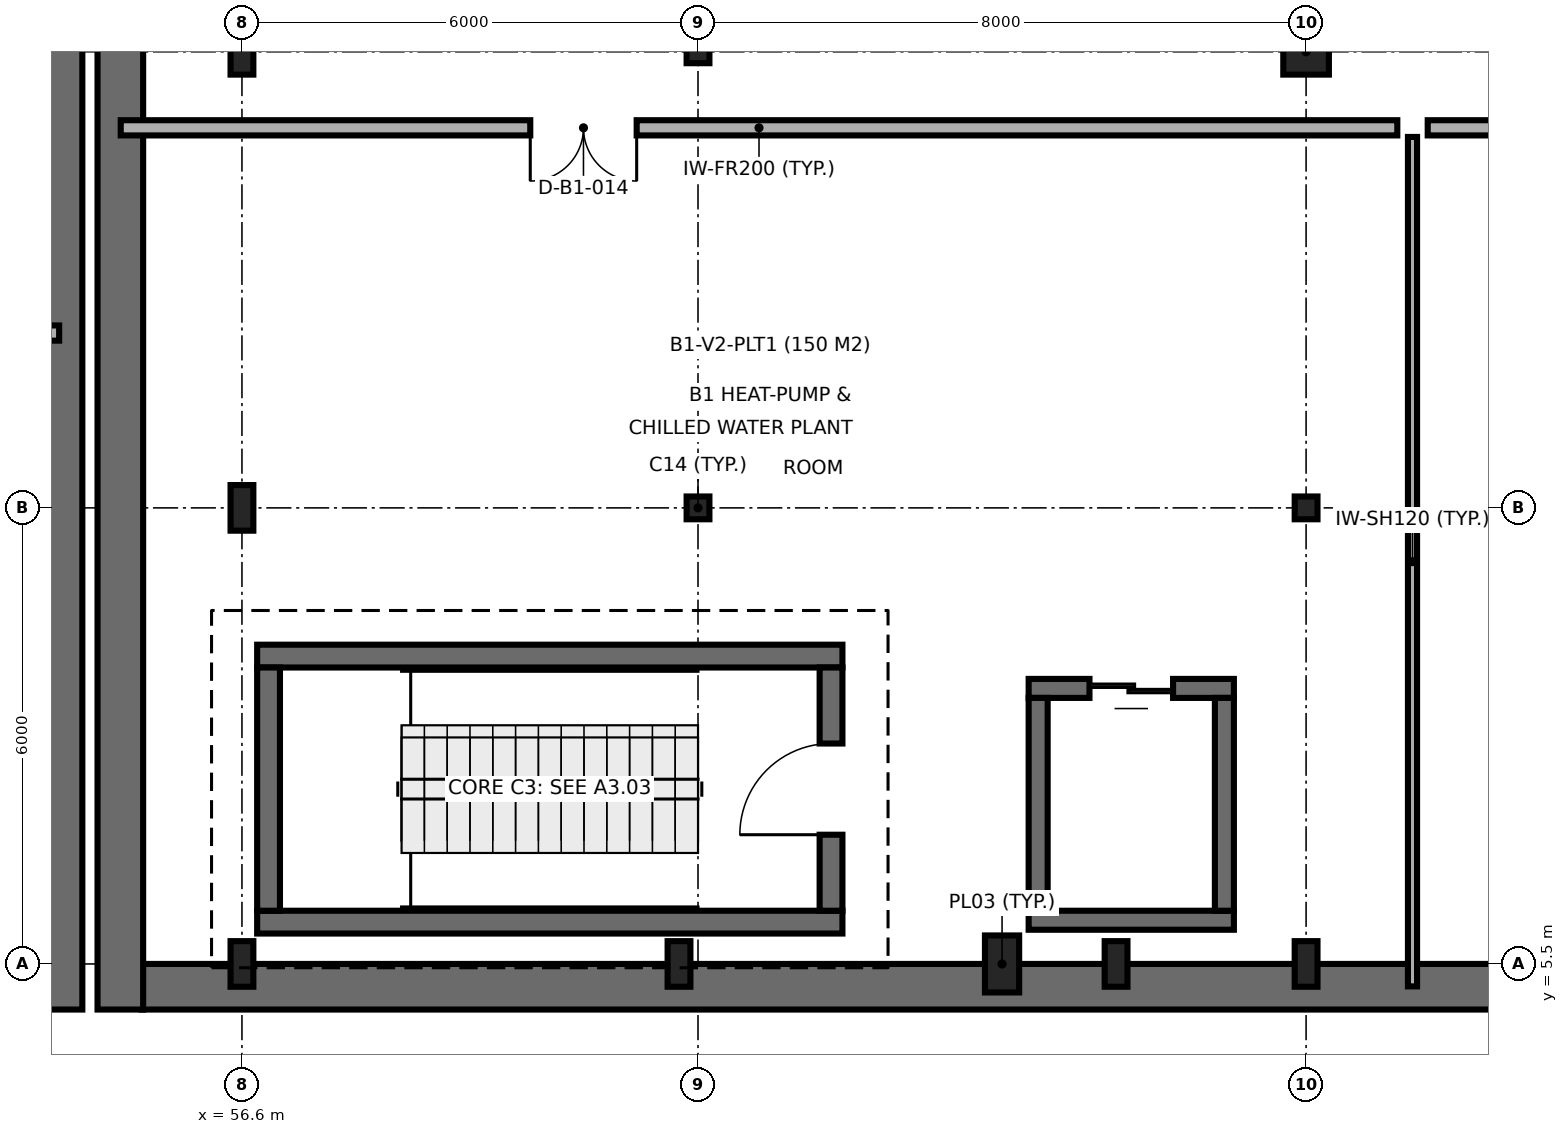
"""IFC4 building model, lengths in metres.
Left out: names, types, materials, properties, quantities, classifications, styles, units other than length and angle.
Written with IfcOpenShell. Run it as: python <this file> out.ifc"""

import sys

from ifc_helpers import new_model, si_unit, direction, frame, frame_2d, origin, origin_2d, place, context, subcontext, project, spatial, rectangle, hollow_rectangle, i_section, extrude, element, fill, save


model = new_model("IFC4")
c1 = context("Model", 3, precision=1e-05, world=origin(), true_north=direction((0.0, 1.0)))
c2 = subcontext(c1, "Body", "Model", "MODEL_VIEW")
j1 = project(units=[si_unit("LENGTHUNIT", "METRE"), si_unit("PLANEANGLEUNIT", "RADIAN")], contexts=[c1])
p1 = place(None, origin())
s1 = spatial("IfcSite", under=j1, at=p1, CompositionType="ELEMENT")
p2 = place(p1, origin())
s2 = spatial("IfcBuilding", under=s1, at=p2, CompositionType="ELEMENT")
p3 = place(p2, frame((0.0, 0.0, -5.0)))
s3 = spatial("IfcBuildingStorey", under=s2, at=p3, CompositionType="ELEMENT", Elevation=-5.0)
for number, where, z_axis, x_axis in (
    (1, (56.6, 5.5, 0.0), (0.0, 0.0, 1.0), (1.0, 0.0, 0.0)),
    (2, (56.6, 11.5, 0.0), (0.0, 0.0, 1.0), (1.0, 0.0, 0.0)),
    (3, (56.6, 17.5, 0.0), (0.0, 0.0, 1.0), (1.0, 0.0, 0.0)),
    (4, (62.35, 5.5, 0.0), (0.0, 0.0, 1.0), (1.0, 0.0, 0.0)),
):
    element("IfcColumn", number, at=place(p3, frame(where, z_axis=z_axis, x_axis=x_axis)), inside=s3, PredefinedType="COLUMN", context=c2, shape_type="SweptSolid", body=[
        extrude(i_section(OverallWidth=0.3, OverallDepth=0.6, WebThickness=0.015, FlangeThickness=0.03, FilletRadius=0.027, at=origin_2d()), origin(), (0.0, 0.0, 1.0), 5.0),
    ])
for number, where, z_axis, x_axis in (
    (5, (62.6, 11.5, 0.0), (0.0, 0.0, 1.0), (1.0, 0.0, 0.0)),
    (6, (62.6, 17.5, 0.0), (0.0, 0.0, 1.0), (1.0, 0.0, 0.0)),
):
    element("IfcColumn", number, at=place(p3, frame(where, z_axis=z_axis, x_axis=x_axis)), inside=s3, PredefinedType="COLUMN", context=c2, shape_type="SweptSolid", body=[
        extrude(hollow_rectangle(XDim=0.3, YDim=0.3, WallThickness=0.012, InnerFilletRadius=0.019, OuterFilletRadius=0.031, at=origin_2d()), origin(), (0.0, 0.0, 1.0), 5.0),
    ])
p4 = place(p3, frame((66.6, 5.5, 0.0), z_axis=(0.0, 0.0, 1.0), x_axis=(1.0, 0.0, 0.0)))
e7 = element("IfcColumn", 7, at=p4, inside=s3, PredefinedType="PILASTER", context=c2, shape_type="SweptSolid", body=[
    extrude(rectangle(XDim=0.45, YDim=0.75, at=origin_2d()), origin(), (0.0, 0.0, 1.0), 5.0),
])
for number, where, z_axis, x_axis in (
    (8, (68.1, 5.5, 0.0), (0.0, 0.0, 1.0), (1.0, 0.0, 0.0)),
    (9, (70.6, 5.5, 0.0), (0.0, 0.0, 1.0), (1.0, 0.0, 0.0)),
):
    element("IfcColumn", number, at=place(p3, frame(where, z_axis=z_axis, x_axis=x_axis)), inside=s3, PredefinedType="COLUMN", context=c2, shape_type="SweptSolid", body=[
        extrude(i_section(OverallWidth=0.3, OverallDepth=0.6, WebThickness=0.015, FlangeThickness=0.03, FilletRadius=0.027, at=origin_2d()), origin(), (0.0, 0.0, 1.0), 5.0),
    ])
p5 = place(p3, frame((70.6, 11.5, 0.0), z_axis=(0.0, 0.0, 1.0), x_axis=(1.0, 0.0, 0.0)))
e10 = element("IfcColumn", 10, at=p5, inside=s3, PredefinedType="COLUMN", context=c2, shape_type="SweptSolid", body=[
    extrude(hollow_rectangle(XDim=0.3, YDim=0.3, WallThickness=0.012, InnerFilletRadius=0.019, OuterFilletRadius=0.031, at=origin_2d()), origin(), (0.0, 0.0, 1.0), 5.0),
])
p6 = place(p3, frame((70.6, 17.5, 0.0), z_axis=(0.0, 0.0, 1.0), x_axis=(1.0, 0.0, 0.0)))
e11 = element("IfcColumn", 11, at=p6, inside=s3, PredefinedType="COLUMN", context=c2, shape_type="SweptSolid", body=[
    extrude(rectangle(XDim=0.6, YDim=0.6, at=origin_2d()), origin(), (0.0, 0.0, 1.0), 5.0),
])
for number, where, z_axis, x_axis in (
    (12, (56.8, 6.05, 0.0), (0.0, 0.0, 1.0), (1.0, 0.0, 0.0)),
    (13, (64.5, 9.55, 0.0), (0.0, 0.0, 1.0), (-1.0, 0.0, 0.0)),
):
    element("IfcWall", number, at=place(p3, frame(where, z_axis=z_axis, x_axis=x_axis)), inside=s3, PredefinedType="SHEAR", context=c2, shape_type="SweptSolid", body=[
        extrude(rectangle(XDim=7.7, YDim=0.3, at=frame_2d((3.85, 0.0))), origin(), (0.0, 0.0, 1.0), 5.0),
    ])
p7 = place(p3, frame((56.95, 9.4, 0.0), z_axis=(0.0, 0.0, 1.0), x_axis=(0.0, -1.0, 0.0)))
e14 = element("IfcWall", 14, at=p7, inside=s3, PredefinedType="SHEAR", context=c2, shape_type="SweptSolid", body=[
    extrude(rectangle(XDim=3.2, YDim=0.3, at=frame_2d((1.6, 0.0))), origin(), (0.0, 0.0, 1.0), 5.0),
])
p8 = place(p3, frame((64.35, 6.2, 0.0), z_axis=(0.0, 0.0, 1.0), x_axis=(0.0, 1.0, 0.0)))
e15 = element("IfcWall", 15, at=p8, inside=s3, PredefinedType="SHEAR", context=c2, shape_type="SweptSolid", body=[
    extrude(rectangle(XDim=3.2, YDim=0.3, at=frame_2d((1.6, 0.0))), origin(), (0.0, 0.0, 1.0), 5.0),
])
p9 = place(p8, frame((1.0, 0.0, 0.0)))
e16 = element("IfcOpeningElement", 16, at=p9, cuts=e15, PredefinedType="OPENING", context=c2, shape_type="SweptSolid", body=[
    extrude(rectangle(XDim=1.2, YDim=2.15, at=frame_2d((0.6, 1.075))), frame((0.0, 0.16, 0.0), z_axis=(0.0, -1.0, 0.0), x_axis=(1.0, 0.0, 0.0)), (0.0, 0.0, 1.0), 0.32),
])
p10 = place(p3, frame((66.95, 6.075, 0.0), z_axis=(0.0, 0.0, 1.0), x_axis=(1.0, 0.0, 0.0)))
e17 = element("IfcWall", 17, at=p10, inside=s3, PredefinedType="SHEAR", context=c2, shape_type="SweptSolid", body=[
    extrude(rectangle(XDim=2.7, YDim=0.25, at=frame_2d((1.35, 0.0))), origin(), (0.0, 0.0, 1.0), 5.0),
])
p11 = place(p3, frame((69.65, 9.125, 0.0), z_axis=(0.0, 0.0, 1.0), x_axis=(-1.0, 0.0, 0.0)))
e18 = element("IfcWall", 18, at=p11, inside=s3, PredefinedType="SHEAR", context=c2, shape_type="SweptSolid", body=[
    extrude(rectangle(XDim=2.7, YDim=0.25, at=frame_2d((1.35, 0.0))), origin(), (0.0, 0.0, 1.0), 5.0),
])
p12 = place(p11, frame((0.8, 0.0, 0.0)))
e19 = element("IfcOpeningElement", 19, at=p12, cuts=e18, PredefinedType="OPENING", context=c2, shape_type="SweptSolid", body=[
    extrude(rectangle(XDim=1.1, YDim=2.15, at=frame_2d((0.55, 1.075))), frame((0.0, 0.135, 0.0), z_axis=(0.0, -1.0, 0.0), x_axis=(1.0, 0.0, 0.0)), (0.0, 0.0, 1.0), 0.27),
])
for number, where, z_axis, x_axis in (
    (20, (67.075, 9.0, 0.0), (0.0, 0.0, 1.0), (0.0, -1.0, 0.0)),
    (21, (69.525, 6.2, 0.0), (0.0, 0.0, 1.0), (0.0, 1.0, 0.0)),
):
    element("IfcWall", number, at=place(p3, frame(where, z_axis=z_axis, x_axis=x_axis)), inside=s3, PredefinedType="SHEAR", context=c2, shape_type="SweptSolid", body=[
        extrude(rectangle(XDim=2.8, YDim=0.25, at=frame_2d((1.4, 0.0))), origin(), (0.0, 0.0, 1.0), 5.0),
    ])
p13 = place(p3, frame((55.282, 5.2, 0.0), z_axis=(0.0, 0.0, 1.0), x_axis=(1.0, 0.0, 0.0)))
e22 = element("IfcWall", 22, at=p13, inside=s3, PredefinedType="SHEAR", context=c2, shape_type="SweptSolid", body=[
    extrude(rectangle(XDim=48.636, YDim=0.6, at=frame_2d((24.318, 0.0))), origin(), (0.0, 0.0, 1.0), 4.7),
])
for number, where, z_axis, x_axis in (
    (23, (55.0, 41.5, 0.0), (0.0, 0.0, 1.0), (0.0, -1.0, 0.0)),
    (24, (54.2, 4.9, 0.0), (0.0, 0.0, 1.0), (0.0, 1.0, 0.0)),
):
    element("IfcWall", number, at=place(p3, frame(where, z_axis=z_axis, x_axis=x_axis)), inside=s3, PredefinedType="SHEAR", context=c2, shape_type="SweptSolid", body=[
        extrude(rectangle(XDim=36.6, YDim=0.6, at=frame_2d((18.3, 0.0))), origin(), (0.0, 0.0, 1.0), 4.7),
    ])
p14 = place(p3, frame((72.0, 5.205, 0.0), z_axis=(0.0, 0.0, 1.0), x_axis=(0.0, 1.0, 0.0)))
e25 = element("IfcWall", 25, at=p14, inside=s3, PredefinedType="PARTITIONING", context=c2, shape_type="SweptSolid", body=[
    extrude(rectangle(XDim=11.175, YDim=0.12, at=frame_2d((5.587, 0.0))), origin(), (0.0, 0.0, 1.0), 4.7),
])
p15 = place(p3, frame((55.005, 16.5, 0.0), z_axis=(0.0, 0.0, 1.0), x_axis=(1.0, 0.0, 0.0)))
e26 = element("IfcWall", 26, at=p15, inside=s3, PredefinedType="SOLIDWALL", context=c2, shape_type="SweptSolid", body=[
    extrude(rectangle(XDim=16.795, YDim=0.2, at=frame_2d((8.397, 0.0))), origin(), (0.0, 0.0, 1.0), 4.7),
])
p16 = place(p15, frame((5.388, 0.0, 0.0)))
e27 = element("IfcOpeningElement", 27, at=p16, cuts=e26, PredefinedType="OPENING", context=c2, shape_type="SweptSolid", body=[
    extrude(rectangle(XDim=1.4, YDim=2.2, at=frame_2d((0.7, 1.1))), frame((0.0, 0.11, 0.0), z_axis=(0.0, -1.0, 0.0), x_axis=(1.0, 0.0, 0.0)), (0.0, 0.0, 1.0), 0.22),
])
p17 = place(p3, frame((72.2, 16.5, 0.0), z_axis=(0.0, 0.0, 1.0), x_axis=(1.0, 0.0, 0.0)))
e28 = element("IfcWall", 28, at=p17, inside=s3, PredefinedType="SOLIDWALL", context=c2, shape_type="SweptSolid", body=[
    extrude(rectangle(XDim=17.6, YDim=0.2, at=frame_2d((8.8, 0.0))), origin(), (0.0, 0.0, 1.0), 4.7),
])
p18 = place(p17, frame((8.05, 0.0, 0.0)))
e29 = element("IfcOpeningElement", 29, at=p18, cuts=e28, PredefinedType="OPENING", context=c2, shape_type="SweptSolid", body=[
    extrude(rectangle(XDim=1.5, YDim=2.2, at=frame_2d((0.75, 1.1))), frame((0.0, 0.11, 0.0), z_axis=(0.0, -1.0, 0.0), x_axis=(1.0, 0.0, 0.0)), (0.0, 0.0, 1.0), 0.22),
])
p19 = place(p3, frame((33.92, 13.8, 0.0), z_axis=(0.0, 0.0, 1.0), x_axis=(1.0, 0.0, 0.0)))
e30 = element("IfcWall", 30, at=p19, inside=s3, PredefinedType="SOLIDWALL", context=c2, shape_type="SweptSolid", body=[
    extrude(rectangle(XDim=20.275, YDim=0.2, at=frame_2d((10.138, 0.0))), origin(), (0.0, 0.0, 1.0), 4.7),
])
p20 = place(p19, frame((10.381, 0.0, 0.0)))
e31 = element("IfcOpeningElement", 31, at=p20, cuts=e30, PredefinedType="OPENING", context=c2, shape_type="SweptSolid", body=[
    extrude(rectangle(XDim=1.4, YDim=2.2, at=frame_2d((0.7, 1.1))), frame((0.0, 0.11, 0.0), z_axis=(0.0, -1.0, 0.0), x_axis=(1.0, 0.0, 0.0)), (0.0, 0.0, 1.0), 0.22),
])
p21 = place(p9, origin())
e32 = element("IfcDoor", 32, at=p21, inside=s3, OperationType="SINGLE_SWING_LEFT", PredefinedType="DOOR", context=c2, shape_type="SweptSolid", body=[
    extrude(rectangle(XDim=1.2, YDim=2.15, at=frame_2d((0.6, 1.075))), frame((0.0, 0.025, 0.0), z_axis=(0.0, -1.0, 0.0), x_axis=(1.0, 0.0, 0.0)), (0.0, 0.0, 1.0), 0.05),
])
fill(e16, e32)
p22 = place(p12, origin())
e33 = element("IfcDoor", 33, at=p22, inside=s3, OperationType="DOUBLE_DOOR_SLIDING", PredefinedType="DOOR", context=c2, shape_type="SweptSolid", body=[
    extrude(rectangle(XDim=1.1, YDim=2.15, at=frame_2d((0.55, 1.075))), frame((0.0, 0.025, 0.0), z_axis=(0.0, -1.0, 0.0), x_axis=(1.0, 0.0, 0.0)), (0.0, 0.0, 1.0), 0.05),
])
fill(e19, e33)
p23 = place(p16, frame((1.4, 0.0, 0.0), z_axis=(0.0, 0.0, 1.0), x_axis=(-1.0, 0.0, 0.0)))
e34 = element("IfcDoor", 34, at=p23, inside=s3, OperationType="DOUBLE_DOOR_SINGLE_SWING", PredefinedType="DOOR", context=c2, shape_type="SweptSolid", body=[
    extrude(rectangle(XDim=1.4, YDim=2.2, at=frame_2d((0.7, 1.1))), frame((0.0, 0.025, 0.0), z_axis=(0.0, -1.0, 0.0), x_axis=(1.0, 0.0, 0.0)), (0.0, 0.0, 1.0), 0.05),
])
fill(e27, e34)
save(model, sys.argv[1])
